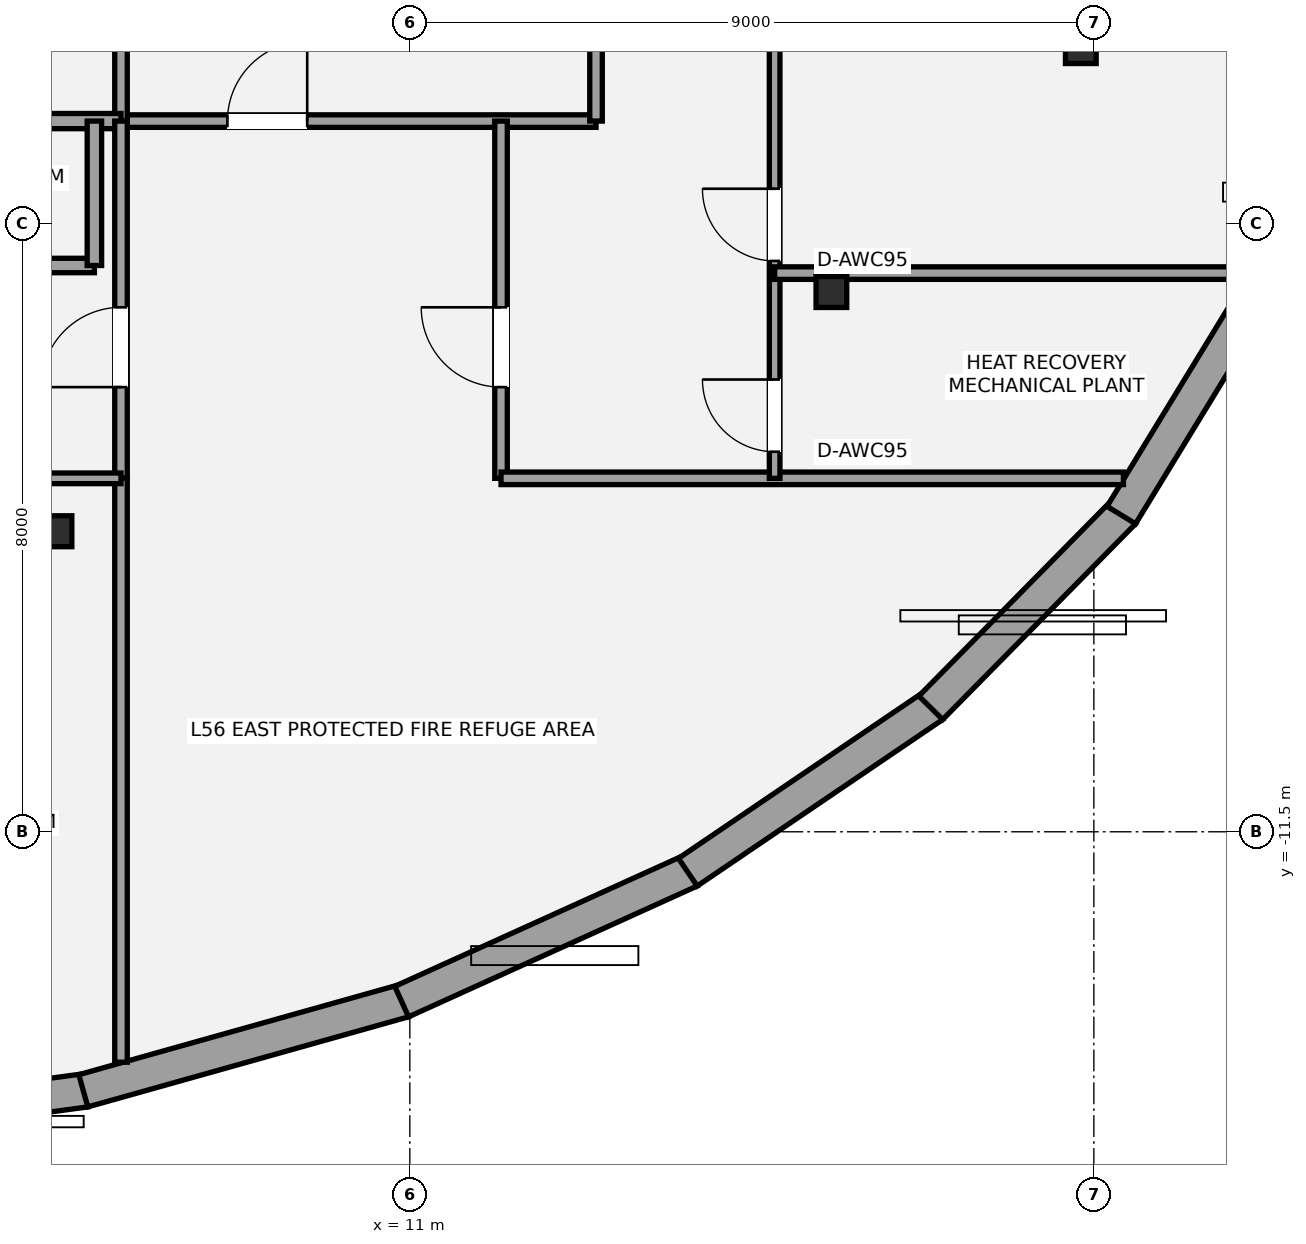
"""IFC4 building model, lengths in metres.
Left out: names, types, materials, properties, quantities, classifications, styles, units other than length and angle.
Written with IfcOpenShell. Run it as: python <this file> out.ifc"""

import sys

from ifc_helpers import new_model, si_unit, direction, frame, frame_2d, origin, origin_2d, place, context, subcontext, project, spatial, rectangle, i_section, extrude, element, fill, save


model = new_model("IFC4")
c1 = context("Model", 3, precision=1e-05, world=origin(), true_north=direction((0.0, 1.0)))
c2 = subcontext(c1, "Body", "Model", "MODEL_VIEW")
j1 = project(units=[si_unit("LENGTHUNIT", "METRE"), si_unit("PLANEANGLEUNIT", "RADIAN")], contexts=[c1])
p1 = place(None, origin())
s1 = spatial("IfcSite", under=j1, at=p1, CompositionType="ELEMENT")
p2 = place(p1, origin())
s2 = spatial("IfcBuilding", under=s1, at=p2, CompositionType="ELEMENT")
p3 = place(p2, frame((0.0, 0.0, 201.4)))
s3 = spatial("IfcBuildingStorey", under=s2, at=p3, CompositionType="ELEMENT", Elevation=201.4)
for number, where, z_axis, x_axis in (
    (1, (6.351, -7.546, 0.0), (0.0, 0.0, 1.0), (1.0, 0.0, 0.0)),
    (2, (16.547, -4.398, 0.0), (0.0, 0.0, 1.0), (1.0, 0.0, 0.0)),
    (3, (19.828, -1.189, 0.0), (0.0, 0.0, 1.0), (1.0, 0.0, 0.0)),
):
    element("IfcColumn", number, at=place(p3, frame(where, z_axis=z_axis, x_axis=x_axis)), inside=s3, PredefinedType="COLUMN", context=c2, shape_type="SweptSolid", body=[
        extrude(i_section(OverallWidth=0.404, OverallDepth=0.407, WebThickness=0.027, FlangeThickness=0.044, at=origin_2d()), origin(), (0.0, 0.0, 1.0), 4.5),
    ])
p4 = place(p3, frame((6.734, -14.902, 0.0), z_axis=(0.0, 0.0, 1.0), x_axis=(-0.991025333234, -0.133674189316, 0.0)))
e4 = element("IfcWall", 4, at=p4, inside=s3, PredefinedType="STANDARD", context=c2, shape_type="SweptSolid", body=[
    extrude(rectangle(XDim=4.52, YDim=0.44, at=frame_2d((2.26, 0.0))), origin(), (0.0, 0.0, 1.0), 3.575),
])
p5 = place(p3, frame((10.924, -13.723, 0.0), z_axis=(0.0, 0.0, 1.0), x_axis=(-0.962743881764, -0.270414899969, 0.0)))
e5 = element("IfcWall", 5, at=p5, inside=s3, PredefinedType="STANDARD", context=c2, shape_type="SweptSolid", body=[
    extrude(rectangle(XDim=4.383, YDim=0.44, at=frame_2d((2.192, 0.0))), origin(), (0.0, 0.0, 1.0), 3.575),
])
p6 = place(p3, frame((14.691, -12.013, 0.0), z_axis=(0.0, 0.0, 1.0), x_axis=(-0.910881102331, -0.412668895624, 0.0)))
e6 = element("IfcWall", 6, at=p6, inside=s3, PredefinedType="STANDARD", context=c2, shape_type="SweptSolid", body=[
    extrude(rectangle(XDim=4.17, YDim=0.44, at=frame_2d((2.085, 0.0))), origin(), (0.0, 0.0, 1.0), 3.575),
])
p7 = place(p3, frame((17.888, -9.841, 0.0), z_axis=(0.0, 0.0, 1.0), x_axis=(-0.827644957237, -0.561252015373, 0.0)))
e7 = element("IfcWall", 7, at=p7, inside=s3, PredefinedType="STANDARD", context=c2, shape_type="SweptSolid", body=[
    extrude(rectangle(XDim=3.902, YDim=0.44, at=frame_2d((1.951, 0.0))), origin(), (0.0, 0.0, 1.0), 3.575),
])
p8 = place(p3, frame((20.392, -7.294, 0.0), z_axis=(0.0, 0.0, 1.0), x_axis=(-0.701887992659, -0.712287333708, 0.0)))
e8 = element("IfcWall", 8, at=p8, inside=s3, PredefinedType="STANDARD", context=c2, shape_type="SweptSolid", body=[
    extrude(rectangle(XDim=3.615, YDim=0.44, at=frame_2d((1.808, 0.0))), origin(), (0.0, 0.0, 1.0), 3.575),
])
p9 = place(p3, frame((22.109, -4.472, 0.0), z_axis=(0.0, 0.0, 1.0), x_axis=(-0.521214394333, -0.853425775999, 0.0)))
e9 = element("IfcWall", 9, at=p9, inside=s3, PredefinedType="STANDARD", context=c2, shape_type="SweptSolid", body=[
    extrude(rectangle(XDim=3.353, YDim=0.44, at=frame_2d((1.677, 0.0))), origin(), (0.0, 0.0, 1.0), 3.575),
])
p10 = place(p3, frame((7.2, -2.15, 0.0), z_axis=(0.0, 0.0, 1.0), x_axis=(1.0, 0.0, 0.0)))
e10 = element("IfcWall", 10, at=p10, inside=s3, PredefinedType="PARTITIONING", context=c2, shape_type="SweptSolid", body=[
    extrude(rectangle(XDim=6.25, YDim=0.165, at=frame_2d((3.125, 0.0))), origin(), (0.0, 0.0, 1.0), 4.28),
])
p11 = place(p10, frame((1.4, 0.0, 0.0)))
e11 = element("IfcOpeningElement", 11, at=p11, cuts=e10, PredefinedType="OPENING", context=c2, shape_type="SweptSolid", body=[
    extrude(rectangle(XDim=1.05, YDim=2.15, at=frame_2d((0.525, 1.075))), frame((0.0, 0.093, 0.0), z_axis=(0.0, -1.0, 0.0), x_axis=(1.0, 0.0, 0.0)), (0.0, 0.0, 1.0), 0.185),
])
p12 = place(p3, frame((7.2, -2.15, 0.0), z_axis=(0.0, 0.0, 1.0), x_axis=(0.0, 1.0, 0.0)))
e12 = element("IfcWall", 12, at=p12, inside=s3, PredefinedType="PARTITIONING", context=c2, shape_type="SweptSolid", body=[
    extrude(rectangle(XDim=3.4, YDim=0.165, at=frame_2d((1.7, 0.0))), origin(), (0.0, 0.0, 1.0), 4.28),
])
p13 = place(p3, frame((13.45, -2.15, 0.0), z_axis=(0.0, 0.0, 1.0), x_axis=(0.0, 1.0, 0.0)))
e13 = element("IfcWall", 13, at=p13, inside=s3, PredefinedType="PARTITIONING", context=c2, shape_type="SweptSolid", body=[
    extrude(rectangle(XDim=3.4, YDim=0.165, at=frame_2d((1.7, 0.0))), origin(), (0.0, 0.0, 1.0), 2.47),
])
p14 = place(p3, frame((4.95, -2.15, 0.0), z_axis=(0.0, 0.0, 1.0), x_axis=(1.0, 0.0, 0.0)))
e14 = element("IfcWall", 14, at=p14, inside=s3, PredefinedType="SOLIDWALL", context=c2, shape_type="SweptSolid", body=[
    extrude(rectangle(XDim=2.25, YDim=0.2, at=frame_2d((1.125, 0.0))), origin(), (0.0, 0.0, 1.0), 2.47),
])
p15 = place(p3, frame((2.1, -4.05, 0.0), z_axis=(0.0, 0.0, 1.0), x_axis=(1.0, 0.0, 0.0)))
e15 = element("IfcWall", 15, at=p15, inside=s3, PredefinedType="PLUMBINGWALL", context=c2, shape_type="SweptSolid", body=[
    extrude(rectangle(XDim=4.75, YDim=0.19, at=frame_2d((2.375, 0.0))), origin(), (0.0, 0.0, 1.0), 2.47),
])
p16 = place(p15, frame((1.8, 0.0, 0.0)))
e16 = element("IfcOpeningElement", 16, at=p16, cuts=e15, PredefinedType="OPENING", context=c2, shape_type="SweptSolid", body=[
    extrude(rectangle(XDim=0.9, YDim=2.1, at=frame_2d((0.45, 1.05))), frame((0.0, 0.105, 0.0), z_axis=(0.0, -1.0, 0.0), x_axis=(1.0, 0.0, 0.0)), (0.0, 0.0, 1.0), 0.21),
])
p17 = place(p3, frame((6.85, -4.05, 0.0), z_axis=(0.0, 0.0, 1.0), x_axis=(0.0, 1.0, 0.0)))
e17 = element("IfcWall", 17, at=p17, inside=s3, PredefinedType="PLUMBINGWALL", context=c2, shape_type="SweptSolid", body=[
    extrude(rectangle(XDim=1.9, YDim=0.19, at=frame_2d((0.95, 0.0))), origin(), (0.0, 0.0, 1.0), 4.28),
])
p18 = place(p3, frame((7.2, -6.85, 0.0), z_axis=(0.0, 0.0, 1.0), x_axis=(0.0, 1.0, 0.0)))
e18 = element("IfcWall", 18, at=p18, inside=s3, PredefinedType="PARTITIONING", context=c2, shape_type="SweptSolid", body=[
    extrude(rectangle(XDim=4.7, YDim=0.165, at=frame_2d((2.35, 0.0))), origin(), (0.0, 0.0, 1.0), 3.733),
])
p19 = place(p18, frame((1.2, 0.0, 0.0)))
e19 = element("IfcOpeningElement", 19, at=p19, cuts=e18, PredefinedType="OPENING", context=c2, shape_type="SweptSolid", body=[
    extrude(rectangle(XDim=1.05, YDim=2.15, at=frame_2d((0.525, 1.075))), frame((0.0, 0.093, 0.0), z_axis=(0.0, -1.0, 0.0), x_axis=(1.0, 0.0, 0.0)), (0.0, 0.0, 1.0), 0.185),
])
p20 = place(p3, frame((12.2, -6.85, 0.0), z_axis=(0.0, 0.0, 1.0), x_axis=(0.0, 1.0, 0.0)))
e20 = element("IfcWall", 20, at=p20, inside=s3, PredefinedType="PARTITIONING", context=c2, shape_type="SweptSolid", body=[
    extrude(rectangle(XDim=4.7, YDim=0.165, at=frame_2d((2.35, 0.0))), origin(), (0.0, 0.0, 1.0), 3.733),
])
p21 = place(p20, frame((1.2, 0.0, 0.0)))
e21 = element("IfcOpeningElement", 21, at=p21, cuts=e20, PredefinedType="OPENING", context=c2, shape_type="SweptSolid", body=[
    extrude(rectangle(XDim=1.05, YDim=2.15, at=frame_2d((0.525, 1.075))), frame((0.0, 0.093, 0.0), z_axis=(0.0, -1.0, 0.0), x_axis=(1.0, 0.0, 0.0)), (0.0, 0.0, 1.0), 0.185),
])
p22 = place(p3, frame((7.2, -14.532, 0.0), z_axis=(0.0, 0.0, 1.0), x_axis=(0.0, 1.0, 0.0)))
e22 = element("IfcWall", 22, at=p22, inside=s3, PredefinedType="PARTITIONING", context=c2, shape_type="SweptSolid", body=[
    extrude(rectangle(XDim=7.682, YDim=0.165, at=frame_2d((3.841, 0.0))), origin(), (0.0, 0.0, 1.0), 4.28),
])
p23 = place(p3, frame((12.2, -6.85, 0.0), z_axis=(0.0, 0.0, 1.0), x_axis=(1.0, 0.0, 0.0)))
e23 = element("IfcWall", 23, at=p23, inside=s3, PredefinedType="PARTITIONING", context=c2, shape_type="SweptSolid", body=[
    extrude(rectangle(XDim=8.189, YDim=0.165, at=frame_2d((4.095, 0.0))), origin(), (0.0, 0.0, 1.0), 3.733),
])
p24 = place(p3, frame((-7.2, -6.85, 0.0), z_axis=(0.0, 0.0, 1.0), x_axis=(1.0, 0.0, 0.0)))
e24 = element("IfcWall", 24, at=p24, inside=s3, PredefinedType="PARTITIONING", context=c2, shape_type="SweptSolid", body=[
    extrude(rectangle(XDim=14.4, YDim=0.14, at=frame_2d((7.2, 0.0))), origin(), (0.0, 0.0, 1.0), 2.47),
])
p25 = place(p24, frame((1.8, 0.0, 0.0)))
e25 = element("IfcOpeningElement", 25, at=p25, cuts=e24, PredefinedType="OPENING", context=c2, shape_type="SweptSolid", body=[
    extrude(rectangle(XDim=0.95, YDim=2.15, at=frame_2d((0.475, 1.075))), frame((0.0, 0.08, 0.0), z_axis=(0.0, -1.0, 0.0), x_axis=(1.0, 0.0, 0.0)), (0.0, 0.0, 1.0), 0.16),
])
p26 = place(p24, frame((9.0, 0.0, 0.0)))
e26 = element("IfcOpeningElement", 26, at=p26, cuts=e24, PredefinedType="OPENING", context=c2, shape_type="SweptSolid", body=[
    extrude(rectangle(XDim=0.95, YDim=2.15, at=frame_2d((0.475, 1.075))), frame((0.0, 0.08, 0.0), z_axis=(0.0, -1.0, 0.0), x_axis=(1.0, 0.0, 0.0)), (0.0, 0.0, 1.0), 0.16),
])
p27 = place(p3, frame((15.8, -6.85, 0.0), z_axis=(0.0, 0.0, 1.0), x_axis=(0.0, 1.0, 0.0)))
e27 = element("IfcWall", 27, at=p27, inside=s3, PredefinedType="PARTITIONING", context=c2, shape_type="SweptSolid", body=[
    extrude(rectangle(XDim=12.25, YDim=0.14, at=frame_2d((6.125, 0.0))), origin(), (0.0, 0.0, 1.0), 2.47),
])
p28 = place(p27, frame((0.35, 0.0, 0.0)))
e28 = element("IfcOpeningElement", 28, at=p28, cuts=e27, PredefinedType="OPENING", context=c2, shape_type="SweptSolid", body=[
    extrude(rectangle(XDim=0.95, YDim=2.15, at=frame_2d((0.475, 1.075))), frame((0.0, 0.08, 0.0), z_axis=(0.0, -1.0, 0.0), x_axis=(1.0, 0.0, 0.0)), (0.0, 0.0, 1.0), 0.16),
])
p29 = place(p27, frame((2.86, 0.0, 0.0)))
e29 = element("IfcOpeningElement", 29, at=p29, cuts=e27, PredefinedType="OPENING", context=c2, shape_type="SweptSolid", body=[
    extrude(rectangle(XDim=0.95, YDim=2.15, at=frame_2d((0.475, 1.075))), frame((0.0, 0.08, 0.0), z_axis=(0.0, -1.0, 0.0), x_axis=(1.0, 0.0, 0.0)), (0.0, 0.0, 1.0), 0.16),
])
p30 = place(p3, frame((15.8, -4.15, 0.0), z_axis=(0.0, 0.0, 1.0), x_axis=(1.0, 0.0, 0.0)))
e30 = element("IfcWall", 30, at=p30, inside=s3, PredefinedType="PARTITIONING", context=c2, shape_type="SweptSolid", body=[
    extrude(rectangle(XDim=6.158, YDim=0.165, at=frame_2d((3.079, 0.0))), origin(), (0.0, 0.0, 1.0), 2.47),
])
p31 = place(p11, origin())
e31 = element("IfcDoor", 31, at=p31, inside=s3, OperationType="SINGLE_SWING_RIGHT", PredefinedType="DOOR", context=c2, shape_type="SweptSolid", body=[
    extrude(rectangle(XDim=1.05, YDim=2.15, at=frame_2d((0.525, 1.075))), frame((0.0, 0.025, 0.0), z_axis=(0.0, -1.0, 0.0), x_axis=(1.0, 0.0, 0.0)), (0.0, 0.0, 1.0), 0.05),
])
fill(e11, e31)
p32 = place(p19, origin())
e32 = element("IfcDoor", 32, at=p32, inside=s3, OperationType="SINGLE_SWING_LEFT", PredefinedType="DOOR", context=c2, shape_type="SweptSolid", body=[
    extrude(rectangle(XDim=1.05, YDim=2.15, at=frame_2d((0.525, 1.075))), frame((0.0, 0.025, 0.0), z_axis=(0.0, -1.0, 0.0), x_axis=(1.0, 0.0, 0.0)), (0.0, 0.0, 1.0), 0.05),
])
fill(e19, e32)
p33 = place(p21, origin())
e33 = element("IfcDoor", 33, at=p33, inside=s3, OperationType="SINGLE_SWING_RIGHT", PredefinedType="DOOR", context=c2, shape_type="SweptSolid", body=[
    extrude(rectangle(XDim=1.05, YDim=2.15, at=frame_2d((0.525, 1.075))), frame((0.0, 0.025, 0.0), z_axis=(0.0, -1.0, 0.0), x_axis=(1.0, 0.0, 0.0)), (0.0, 0.0, 1.0), 0.05),
])
fill(e21, e33)
p34 = place(p28, origin())
e34 = element("IfcDoor", 34, at=p34, inside=s3, OperationType="SINGLE_SWING_RIGHT", PredefinedType="DOOR", context=c2, shape_type="SweptSolid", body=[
    extrude(rectangle(XDim=0.95, YDim=2.15, at=frame_2d((0.475, 1.075))), frame((0.0, 0.025, 0.0), z_axis=(0.0, -1.0, 0.0), x_axis=(1.0, 0.0, 0.0)), (0.0, 0.0, 1.0), 0.05),
])
fill(e28, e34)
p35 = place(p29, origin())
e35 = element("IfcDoor", 35, at=p35, inside=s3, OperationType="SINGLE_SWING_RIGHT", PredefinedType="DOOR", context=c2, shape_type="SweptSolid", body=[
    extrude(rectangle(XDim=0.95, YDim=2.15, at=frame_2d((0.475, 1.075))), frame((0.0, 0.025, 0.0), z_axis=(0.0, -1.0, 0.0), x_axis=(1.0, 0.0, 0.0)), (0.0, 0.0, 1.0), 0.05),
])
fill(e29, e35)
save(model, sys.argv[1])
